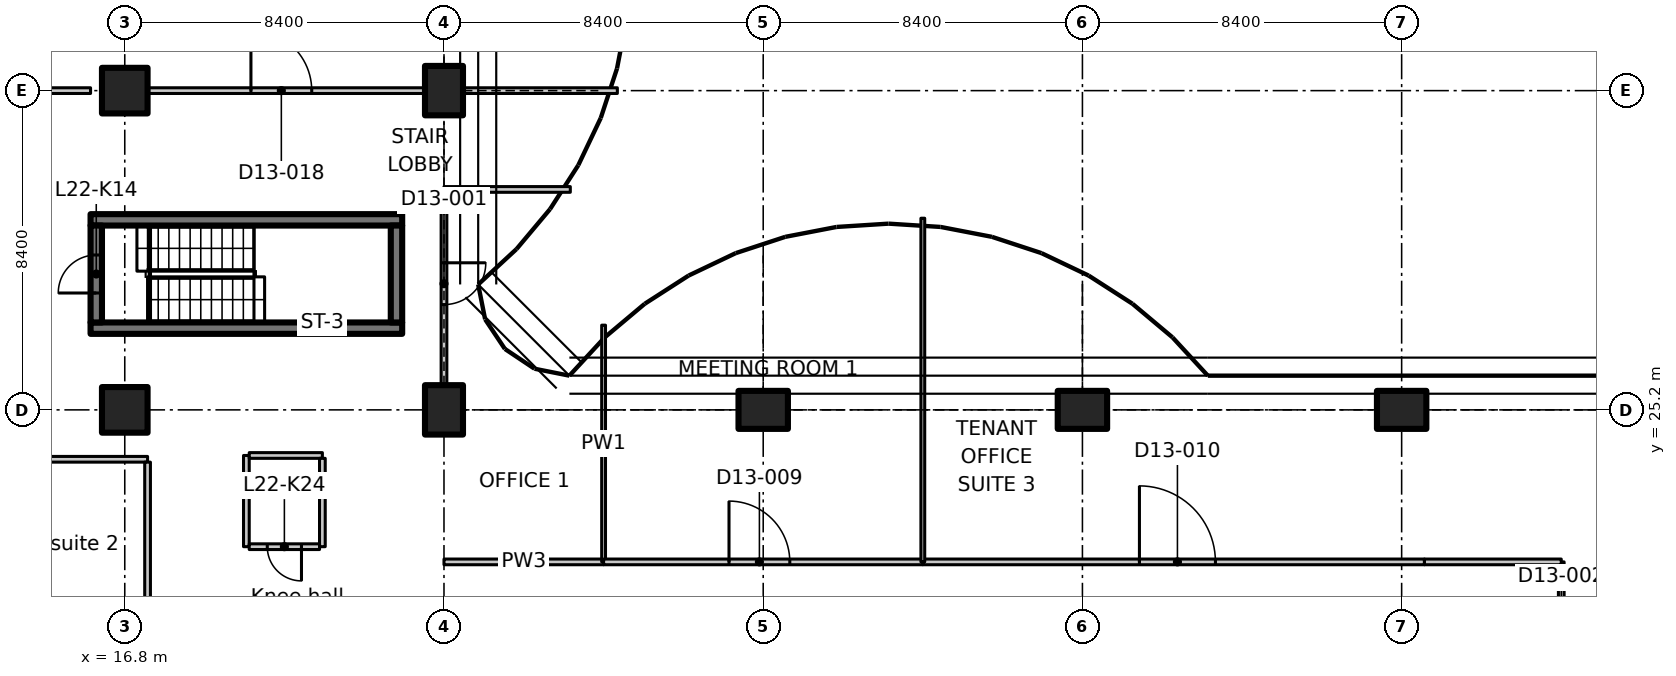
"""IFC4 building model, lengths in metres.
Left out: names, types, materials, properties, quantities, classifications, styles, units other than length and angle.
Written with IfcOpenShell. Run it as: python <this file> out.ifc"""

import sys

from ifc_helpers import new_model, si_unit, direction, frame, frame_2d, origin, origin_2d, place, context, subcontext, project, spatial, polyline, rectangle, outline, extrude, element, fill, save


model = new_model("IFC4")
c1 = context("Model", 3, precision=1e-05, world=origin(), true_north=direction((0.0, 1.0)))
c2 = subcontext(c1, "Body", "Model", "MODEL_VIEW")
j1 = project(units=[si_unit("LENGTHUNIT", "METRE"), si_unit("PLANEANGLEUNIT", "RADIAN")], contexts=[c1])
p1 = place(None, origin())
s1 = spatial("IfcSite", under=j1, at=p1, CompositionType="ELEMENT")
p2 = place(p1, origin())
s2 = spatial("IfcBuilding", under=s1, at=p2, CompositionType="ELEMENT")
p3 = place(p2, frame((0.0, 0.0, 95.3)))
s3 = spatial("IfcBuildingStorey", under=s2, at=p3, CompositionType="ELEMENT", Elevation=95.3)
for number, where, z_axis, x_axis in (
    (1, (16.8, 25.2, 0.0), (0.0, 0.0, 1.0), (1.0, 0.0, 0.0)),
    (2, (16.8, 33.6, 0.0), (0.0, 0.0, 1.0), (1.0, 0.0, 0.0)),
):
    element("IfcColumn", number, at=place(p3, frame(where, z_axis=z_axis, x_axis=x_axis)), inside=s3, PredefinedType="COLUMN", context=c2, shape_type="SweptSolid", body=[
        extrude(rectangle(XDim=1.2, YDim=1.2, at=origin_2d()), origin(), (0.0, 0.0, 1.0), 3.35),
    ])
for number, where, z_axis, x_axis in (
    (3, (25.2, 25.2, 0.0), (0.0, 0.0, 1.0), (1.0, 0.0, 0.0)),
    (4, (25.2, 33.6, 0.0), (0.0, 0.0, 1.0), (1.0, 0.0, 0.0)),
    (5, (33.6, 25.2, 0.0), (0.0, 0.0, 1.0), (0.0, 1.0, 0.0)),
    (6, (42.0, 25.2, 0.0), (0.0, 0.0, 1.0), (0.0, 1.0, 0.0)),
    (7, (50.4, 25.2, 0.0), (0.0, 0.0, 1.0), (0.0, 1.0, 0.0)),
):
    element("IfcColumn", number, at=place(p3, frame(where, z_axis=z_axis, x_axis=x_axis)), inside=s3, PredefinedType="COLUMN", context=c2, shape_type="SweptSolid", body=[
        extrude(rectangle(XDim=1.0, YDim=1.3, at=origin_2d()), origin(), (0.0, 0.0, 1.0), 3.35),
    ])
for number, where, z_axis, x_axis in (
    (8, (15.9, 27.35, 0.0), (0.0, 0.0, 1.0), (1.0, 0.0, 0.0)),
    (9, (15.9, 30.2, 0.0), (0.0, 0.0, 1.0), (1.0, 0.0, 0.0)),
):
    element("IfcWall", number, at=place(p3, frame(where, z_axis=z_axis, x_axis=x_axis)), inside=s3, PredefinedType="SHEAR", context=c2, shape_type="SweptSolid", body=[
        extrude(rectangle(XDim=8.2, YDim=0.3, at=frame_2d((4.1, 0.0))), origin(), (0.0, 0.0, 1.0), 3.35),
    ])
p4 = place(p3, frame((16.05, 27.5, 0.0), z_axis=(0.0, 0.0, 1.0), x_axis=(0.0, 1.0, 0.0)))
e10 = element("IfcWall", 10, at=p4, inside=s3, PredefinedType="SHEAR", context=c2, shape_type="SweptSolid", body=[
    extrude(rectangle(XDim=2.55, YDim=0.3, at=frame_2d((1.275, 0.0))), origin(), (0.0, 0.0, 1.0), 3.35),
])
p5 = place(p4, frame((0.775, 0.0, 0.0)))
e11 = element("IfcOpeningElement", 11, at=p5, cuts=e10, PredefinedType="OPENING", context=c2, shape_type="SweptSolid", body=[
    extrude(rectangle(XDim=1.0, YDim=2.1, at=frame_2d((0.5, 1.05))), frame((0.0, 0.16, 0.0), z_axis=(0.0, -1.0, 0.0), x_axis=(1.0, 0.0, 0.0)), (0.0, 0.0, 1.0), 0.32),
])
p6 = place(p3, frame((23.95, 27.5, 0.0), z_axis=(0.0, 0.0, 1.0), x_axis=(0.0, 1.0, 0.0)))
e12 = element("IfcWall", 12, at=p6, inside=s3, PredefinedType="SHEAR", context=c2, shape_type="SweptSolid", body=[
    extrude(rectangle(XDim=2.55, YDim=0.3, at=frame_2d((1.275, 0.0))), origin(), (0.0, 0.0, 1.0), 3.35),
])
p7 = place(p3, frame((12.9, 23.9, 0.0), z_axis=(0.0, 0.0, 1.0), x_axis=(1.0, 0.0, 0.0)))
e13 = element("IfcWall", 13, at=p7, inside=s3, PredefinedType="PARTITIONING", context=c2, shape_type="SweptSolid", body=[
    extrude(rectangle(XDim=4.5, YDim=0.15, at=frame_2d((2.25, 0.0))), origin(), (0.0, 0.0, 1.0), 3.35),
])
p8 = place(p3, frame((17.4, 23.825, 0.0), z_axis=(0.0, 0.0, 1.0), x_axis=(0.0, -1.0, 0.0)))
e14 = element("IfcWall", 14, at=p8, inside=s3, PredefinedType="PARTITIONING", context=c2, shape_type="SweptSolid", body=[
    extrude(rectangle(XDim=4.425, YDim=0.15, at=frame_2d((2.212, 0.0))), origin(), (0.0, 0.0, 1.0), 3.35),
])
p9 = place(p3, frame((20.0, 21.6, 0.0), z_axis=(0.0, 0.0, 1.0), x_axis=(0.0, 1.0, 0.0)))
e15 = element("IfcWall", 15, at=p9, inside=s3, PredefinedType="PARTITIONING", context=c2, shape_type="SweptSolid", body=[
    extrude(rectangle(XDim=2.4, YDim=0.15, at=frame_2d((1.2, 0.0))), origin(), (0.0, 0.0, 1.0), 3.35),
])
p10 = place(p3, frame((20.075, 24.0, 0.0), z_axis=(0.0, 0.0, 1.0), x_axis=(1.0, 0.0, 0.0)))
e16 = element("IfcWall", 16, at=p10, inside=s3, PredefinedType="PARTITIONING", context=c2, shape_type="SweptSolid", body=[
    extrude(rectangle(XDim=1.925, YDim=0.15, at=frame_2d((0.962, 0.0))), origin(), (0.0, 0.0, 1.0), 3.35),
])
p11 = place(p3, frame((22.0, 23.925, 0.0), z_axis=(0.0, 0.0, 1.0), x_axis=(0.0, -1.0, 0.0)))
e17 = element("IfcWall", 17, at=p11, inside=s3, PredefinedType="PARTITIONING", context=c2, shape_type="SweptSolid", body=[
    extrude(rectangle(XDim=2.325, YDim=0.15, at=frame_2d((1.163, 0.0))), origin(), (0.0, 0.0, 1.0), 3.35),
])
p12 = place(p3, frame((21.925, 21.6, 0.0), z_axis=(0.0, 0.0, 1.0), x_axis=(-1.0, 0.0, 0.0)))
e18 = element("IfcWall", 18, at=p12, inside=s3, PredefinedType="PARTITIONING", context=c2, shape_type="SweptSolid", body=[
    extrude(rectangle(XDim=1.85, YDim=0.15, at=frame_2d((0.925, 0.0))), origin(), (0.0, 0.0, 1.0), 3.35),
])
p13 = place(p12, frame((0.475, 0.0, 0.0)))
e19 = element("IfcOpeningElement", 19, at=p13, cuts=e18, PredefinedType="OPENING", context=c2, shape_type="SweptSolid", body=[
    extrude(rectangle(XDim=0.9, YDim=2.1, at=frame_2d((0.45, 1.05))), frame((0.0, 0.085, 0.0), z_axis=(0.0, -1.0, 0.0), x_axis=(1.0, 0.0, 0.0)), (0.0, 0.0, 1.0), 0.17),
])
p14 = place(p3, frame((25.2, 21.2, 0.0), z_axis=(0.0, 0.0, 1.0), x_axis=(1.0, 0.0, 0.0)))
e20 = element("IfcWall", 20, at=p14, inside=s3, PredefinedType="PARTITIONING", context=c2, shape_type="SweptSolid", body=[
    extrude(rectangle(XDim=4.2, YDim=0.15, at=frame_2d((2.1, 0.0))), origin(), (0.0, 0.0, 1.0), 3.33),
])
p15 = place(p3, frame((29.4, 27.429, 0.0), z_axis=(0.0, 0.0, 1.0), x_axis=(0.0, -1.0, 0.0)))
e21 = element("IfcWall", 21, at=p15, inside=s3, PredefinedType="PARTITIONING", context=c2, shape_type="SweptSolid", body=[
    extrude(outline(polyline([(0.0, 0.0), (6.229, 0.0), (6.229, 3.33), (2.679, 3.33), (2.677, 2.98), (1.781, 2.98), (1.779, 3.33), (0.154, 3.33), (0.0, 3.33), (0.0, 0.0)])), frame((0.0, 0.05, 0.0), z_axis=(0.0, -1.0, 0.0), x_axis=(1.0, 0.0, 0.0)), (0.0, 0.0, 1.0), 0.1),
])
p16 = place(p3, frame((25.2, 31.0, 0.0), z_axis=(0.0, 0.0, 1.0), x_axis=(0.0, -1.0, 0.0)))
e22 = element("IfcWall", 22, at=p16, inside=s3, PredefinedType="PARTITIONING", context=c2, shape_type="SweptSolid", body=[
    extrude(outline(polyline([(0.0, 0.0), (5.13, 0.0), (5.13, 2.98), (0.0, 2.98), (0.0, 0.0)])), frame((0.0, 0.075, 0.0), z_axis=(0.0, -1.0, 0.0), x_axis=(1.0, 0.0, 0.0)), (0.0, 0.0, 1.0), 0.15),
])
p17 = place(p16, frame((1.93, 0.0, 0.0)))
e23 = element("IfcOpeningElement", 23, at=p17, cuts=e22, PredefinedType="OPENING", context=c2, shape_type="SweptSolid", body=[
    extrude(rectangle(XDim=1.1, YDim=2.1, at=frame_2d((0.55, 1.05))), frame((0.0, 0.085, 0.0), z_axis=(0.0, -1.0, 0.0), x_axis=(1.0, 0.0, 0.0)), (0.0, 0.0, 1.0), 0.17),
])
p18 = place(p3, frame((25.2, 31.0, 0.0), z_axis=(0.0, 0.0, 1.0), x_axis=(1.0, 0.0, 0.0)))
e24 = element("IfcWall", 24, at=p18, inside=s3, PredefinedType="PARTITIONING", context=c2, shape_type="SweptSolid", body=[
    extrude(rectangle(XDim=3.324, YDim=0.15, at=frame_2d((1.662, 0.0))), origin(), (0.0, 0.0, 1.0), 2.98),
])
p19 = place(p3, frame((54.6, 21.2, 0.0), z_axis=(0.0, 0.0, 1.0), x_axis=(0.0, -1.0, 0.0)))
e25 = element("IfcWall", 25, at=p19, inside=s3, PredefinedType="PARTITIONING", context=c2, shape_type="SweptSolid", body=[
    extrude(rectangle(XDim=8.2, YDim=0.15, at=frame_2d((4.1, 0.0))), origin(), (0.0, 0.0, 1.0), 3.33),
])
p20 = place(p19, frame((3.2, 0.0, 0.0)))
e26 = element("IfcOpeningElement", 26, at=p20, cuts=e25, PredefinedType="OPENING", context=c2, shape_type="SweptSolid", body=[
    extrude(rectangle(XDim=2.0, YDim=2.4, at=frame_2d((1.0, 1.2))), frame((0.0, 0.085, 0.0), z_axis=(0.0, -1.0, 0.0), x_axis=(1.0, 0.0, 0.0)), (0.0, 0.0, 1.0), 0.17),
])
p21 = place(p3, frame((29.4, 21.2, 0.0), z_axis=(0.0, 0.0, 1.0), x_axis=(1.0, 0.0, 0.0)))
e27 = element("IfcWall", 27, at=p21, inside=s3, PredefinedType="PARTITIONING", context=c2, shape_type="SweptSolid", body=[
    extrude(rectangle(XDim=8.4, YDim=0.15, at=frame_2d((4.2, 0.0))), origin(), (0.0, 0.0, 1.0), 3.33),
])
p22 = place(p21, frame((3.3, 0.0, 0.0)))
e28 = element("IfcOpeningElement", 28, at=p22, cuts=e27, PredefinedType="OPENING", context=c2, shape_type="SweptSolid", body=[
    extrude(rectangle(XDim=1.6, YDim=2.1, at=frame_2d((0.8, 1.05))), frame((0.0, 0.085, 0.0), z_axis=(0.0, -1.0, 0.0), x_axis=(1.0, 0.0, 0.0)), (0.0, 0.0, 1.0), 0.17),
])
p23 = place(p3, frame((37.8, 21.2, 0.0), z_axis=(0.0, 0.0, 1.0), x_axis=(1.0, 0.0, 0.0)))
e29 = element("IfcWall", 29, at=p23, inside=s3, PredefinedType="PARTITIONING", context=c2, shape_type="SweptSolid", body=[
    extrude(rectangle(XDim=13.2, YDim=0.15, at=frame_2d((6.6, 0.0))), origin(), (0.0, 0.0, 1.0), 3.33),
])
p24 = place(p23, frame((5.7, 0.0, 0.0)))
e30 = element("IfcOpeningElement", 30, at=p24, cuts=e29, PredefinedType="OPENING", context=c2, shape_type="SweptSolid", body=[
    extrude(rectangle(XDim=2.0, YDim=2.4, at=frame_2d((1.0, 1.2))), frame((0.0, 0.085, 0.0), z_axis=(0.0, -1.0, 0.0), x_axis=(1.0, 0.0, 0.0)), (0.0, 0.0, 1.0), 0.17),
])
p25 = place(p3, frame((51.0, 21.2, 0.0), z_axis=(0.0, 0.0, 1.0), x_axis=(1.0, 0.0, 0.0)))
e31 = element("IfcWall", 31, at=p25, inside=s3, PredefinedType="PARTITIONING", context=c2, shape_type="SweptSolid", body=[
    extrude(rectangle(XDim=3.6, YDim=0.15, at=frame_2d((1.8, 0.0))), origin(), (0.0, 0.0, 1.0), 3.33),
])
p26 = place(p3, frame((37.8, 30.243, 0.0), z_axis=(0.0, 0.0, 1.0), x_axis=(0.0, -1.0, 0.0)))
e32 = element("IfcWall", 32, at=p26, inside=s3, PredefinedType="PARTITIONING", context=c2, shape_type="SweptSolid", body=[
    extrude(outline(polyline([(0.0, 0.0), (9.043, 0.0), (9.043, 3.33), (5.493, 3.33), (5.491, 2.98), (4.595, 2.98), (4.593, 3.33), (0.0, 3.33), (0.0, 0.0)])), frame((0.0, 0.05, 0.0), z_axis=(0.0, -1.0, 0.0), x_axis=(1.0, 0.0, 0.0)), (0.0, 0.0, 1.0), 0.1),
])
p27 = place(p3, frame((14.4, 33.6, 0.0), z_axis=(0.0, 0.0, 1.0), x_axis=(1.0, 0.0, 0.0)))
e33 = element("IfcWall", 33, at=p27, inside=s3, PredefinedType="PARTITIONING", context=c2, shape_type="SweptSolid", body=[
    extrude(rectangle(XDim=1.5, YDim=0.15, at=frame_2d((0.75, 0.0))), origin(), (0.0, 0.0, 1.0), 3.33),
])
p28 = place(p3, frame((17.42, 33.6, 0.0), z_axis=(0.0, 0.0, 1.0), x_axis=(1.0, 0.0, 0.0)))
e34 = element("IfcWall", 34, at=p28, inside=s3, PredefinedType="PARTITIONING", context=c2, shape_type="SweptSolid", body=[
    extrude(rectangle(XDim=7.26, YDim=0.15, at=frame_2d((3.63, 0.0))), origin(), (0.0, 0.0, 1.0), 3.33),
])
p29 = place(p28, frame((2.7, 0.0, 0.0)))
e35 = element("IfcOpeningElement", 35, at=p29, cuts=e34, PredefinedType="OPENING", context=c2, shape_type="SweptSolid", body=[
    extrude(rectangle(XDim=1.6, YDim=2.1, at=frame_2d((0.8, 1.05))), frame((0.0, 0.085, 0.0), z_axis=(0.0, -1.0, 0.0), x_axis=(1.0, 0.0, 0.0)), (0.0, 0.0, 1.0), 0.17),
])
p30 = place(p3, frame((25.72, 33.6, 0.0), z_axis=(0.0, 0.0, 1.0), x_axis=(1.0, 0.0, 0.0)))
e36 = element("IfcWall", 36, at=p30, inside=s3, PredefinedType="PARTITIONING", context=c2, shape_type="SweptSolid", body=[
    extrude(rectangle(XDim=4.042, YDim=0.15, at=frame_2d((2.021, 0.0))), origin(), (0.0, 0.0, 1.0), 2.98),
])
p31 = place(p5, origin())
e37 = element("IfcDoor", 37, at=p31, inside=s3, OperationType="SINGLE_SWING_LEFT", PredefinedType="DOOR", context=c2, shape_type="SweptSolid", body=[
    extrude(rectangle(XDim=1.0, YDim=2.1, at=frame_2d((0.5, 1.05))), frame((0.0, 0.025, 0.0), z_axis=(0.0, -1.0, 0.0), x_axis=(1.0, 0.0, 0.0)), (0.0, 0.0, 1.0), 0.05),
])
fill(e11, e37)
p32 = place(p13, origin())
e38 = element("IfcDoor", 38, at=p32, inside=s3, OperationType="SINGLE_SWING_LEFT", PredefinedType="DOOR", context=c2, shape_type="SweptSolid", body=[
    extrude(rectangle(XDim=0.9, YDim=2.1, at=frame_2d((0.45, 1.05))), frame((0.0, 0.025, 0.0), z_axis=(0.0, -1.0, 0.0), x_axis=(1.0, 0.0, 0.0)), (0.0, 0.0, 1.0), 0.05),
])
fill(e19, e38)
p33 = place(p17, origin())
e39 = element("IfcDoor", 39, at=p33, inside=s3, OperationType="SINGLE_SWING_RIGHT", PredefinedType="DOOR", context=c2, shape_type="SweptSolid", body=[
    extrude(rectangle(XDim=1.1, YDim=2.1, at=frame_2d((0.55, 1.05))), frame((0.0, 0.025, 0.0), z_axis=(0.0, -1.0, 0.0), x_axis=(1.0, 0.0, 0.0)), (0.0, 0.0, 1.0), 0.05),
])
fill(e23, e39)
p34 = place(p22, origin())
e40 = element("IfcDoor", 40, at=p34, inside=s3, OperationType="DOUBLE_DOOR_SINGLE_SWING", PredefinedType="DOOR", context=c2, shape_type="SweptSolid", body=[
    extrude(rectangle(XDim=1.6, YDim=2.1, at=frame_2d((0.8, 1.05))), frame((0.0, 0.025, 0.0), z_axis=(0.0, -1.0, 0.0), x_axis=(1.0, 0.0, 0.0)), (0.0, 0.0, 1.0), 0.05),
])
fill(e28, e40)
p35 = place(p24, origin())
e41 = element("IfcDoor", 41, at=p35, inside=s3, OperationType="DOUBLE_DOOR_SINGLE_SWING", PredefinedType="DOOR", context=c2, shape_type="SweptSolid", body=[
    extrude(rectangle(XDim=2.0, YDim=2.4, at=frame_2d((1.0, 1.2))), frame((0.0, 0.025, 0.0), z_axis=(0.0, -1.0, 0.0), x_axis=(1.0, 0.0, 0.0)), (0.0, 0.0, 1.0), 0.05),
])
fill(e30, e41)
p36 = place(p29, origin())
e42 = element("IfcDoor", 42, at=p36, inside=s3, OperationType="DOUBLE_DOOR_SINGLE_SWING", PredefinedType="DOOR", context=c2, shape_type="SweptSolid", body=[
    extrude(rectangle(XDim=1.6, YDim=2.1, at=frame_2d((0.8, 1.05))), frame((0.0, 0.025, 0.0), z_axis=(0.0, -1.0, 0.0), x_axis=(1.0, 0.0, 0.0)), (0.0, 0.0, 1.0), 0.05),
])
fill(e35, e42)
save(model, sys.argv[1])
